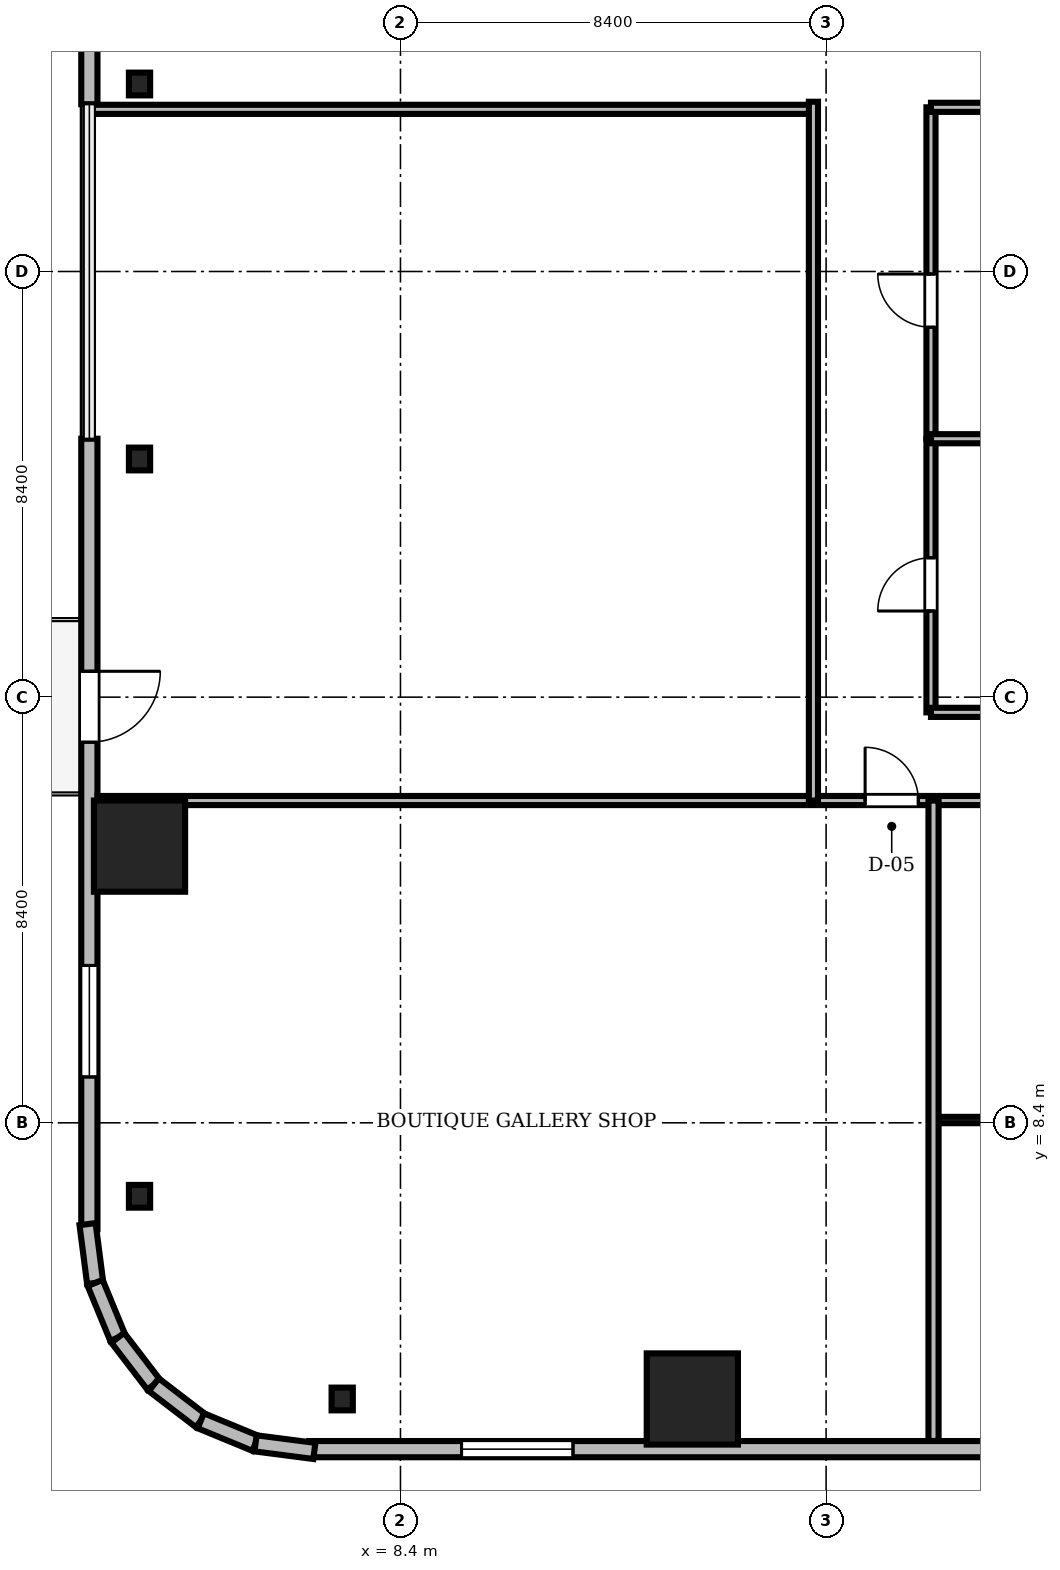
"""IFC4 building model, lengths in metres.
Left out: names, types, materials, properties, quantities, classifications, styles, units other than length and angle.
Written with IfcOpenShell. Run it as: python <this file> out.ifc"""

import sys

from ifc_helpers import new_model, si_unit, direction, frame, frame_2d, origin, origin_2d, place, context, subcontext, project, spatial, rectangle, i_section, extrude, source, transform, mapped, element, fill, save


model = new_model("IFC4")
c1 = context("Model", 3, precision=1e-05, world=origin(), true_north=direction((0.0, 1.0)))
c2 = subcontext(c1, "Body", "Model", "MODEL_VIEW")
j1 = project(units=[si_unit("LENGTHUNIT", "METRE"), si_unit("PLANEANGLEUNIT", "RADIAN")], contexts=[c1])
p1 = place(None, origin())
s1 = spatial("IfcSite", under=j1, at=p1, CompositionType="ELEMENT")
p2 = place(p1, origin())
s2 = spatial("IfcBuilding", under=s1, at=p2, CompositionType="ELEMENT")
p3 = place(p2, frame((0.0, 0.0, 75.05)))
s3 = spatial("IfcBuildingStorey", under=s2, at=p3, CompositionType="ELEMENT", Elevation=75.05)
m1 = source(origin(), c2, "Body", "SweptSolid", [
    extrude(rectangle(XDim=1.8, YDim=1.8, at=origin_2d()), origin(), (0.0, 0.0, 1.0), 3.41),
])
for number, where, z_axis, x_axis in (
    (1, (14.16, 2.95, 0.0), (0.0, 0.0, 1.0), (1.0, 0.0, 0.0)),
    (2, (3.25, 13.86, 0.0), (0.0, 0.0, 1.0), (1.0, 0.0, 0.0)),
):
    element("IfcColumn", number, at=place(p3, frame(where, z_axis=z_axis, x_axis=x_axis)), inside=s3, PredefinedType="COLUMN", context=c2, shape_type="MappedRepresentation", body=[
        mapped(m1, transform((0.0, 0.0, 0.0), scale=1.0)),
    ])
m2 = source(origin(), c2, "Body", "SweptSolid", [
    extrude(i_section(OverallWidth=0.419, OverallDepth=0.449, WebThickness=0.031, FlangeThickness=0.048, FilletRadius=0.015, at=origin_2d()), origin(), (0.0, 0.0, 1.0), 3.41),
])
for number, where, z_axis, x_axis in (
    (3, (7.25, 2.95, 0.0), (0.0, 0.0, 1.0), (1.0, 0.0, 0.0)),
    (4, (3.25, 28.9, 0.0), (0.0, 0.0, 1.0), (1.0, 0.0, 0.0)),
    (5, (3.25, 21.5, 0.0), (0.0, 0.0, 1.0), (1.0, 0.0, 0.0)),
    (6, (3.25, 6.95, 0.0), (0.0, 0.0, 1.0), (1.0, 0.0, 0.0)),
):
    element("IfcColumn", number, at=place(p3, frame(where, z_axis=z_axis, x_axis=x_axis)), inside=s3, PredefinedType="COLUMN", context=c2, shape_type="MappedRepresentation", body=[
        mapped(m2, transform((0.0, 0.0, 0.0), scale=1.0)),
    ])
m3 = source(origin(), c2, "Body", "SweptSolid", [
    extrude(rectangle(XDim=15.6, YDim=0.32, at=frame_2d((7.8, 0.0))), origin(), (0.0, 0.0, 1.0), 3.41),
])
p4 = place(p3, frame((6.6, 1.96, 0.0), z_axis=(0.0, 0.0, 1.0), x_axis=(1.0, 0.0, 0.0)))
e7 = element("IfcWall", 7, at=p4, inside=s3, PredefinedType="SOLIDWALL", context=c2, shape_type="MappedRepresentation", body=[
    mapped(m3, transform((0.0, 0.0, 0.0), scale=1.0)),
])
m4 = source(origin(), c2, "Body", "SweptSolid", [
    extrude(rectangle(XDim=2.2, YDim=2.4, at=frame_2d((1.1, 1.2))), frame((0.0, 0.17, 0.0), z_axis=(0.0, -1.0, 0.0), x_axis=(1.0, 0.0, 0.0)), (0.0, 0.0, 1.0), 0.34),
])
p5 = place(p4, frame((3.005, 0.0, 0.72)))
e8 = element("IfcOpeningElement", 8, at=p5, cuts=e7, PredefinedType="OPENING", context=c2, shape_type="MappedRepresentation", body=[
    mapped(m4, transform((0.0, 0.0, 0.0), scale=1.0)),
])
m5 = source(origin(), c2, "Body", "SweptSolid", [
    extrude(rectangle(XDim=15.6, YDim=0.32, at=frame_2d((7.8, 0.0))), origin(), (0.0, 0.0, 1.0), 3.41),
])
p6 = place(p3, frame((2.26, 44.1, 0.0), z_axis=(0.0, 0.0, 1.0), x_axis=(0.0, -1.0, 0.0)))
e9 = element("IfcWall", 9, at=p6, inside=s3, PredefinedType="SOLIDWALL", context=c2, shape_type="MappedRepresentation", body=[
    mapped(m5, transform((0.0, 0.0, 0.0), scale=1.0)),
])
p7 = place(p6, frame((3.005, 0.0, 0.72)))
e10 = element("IfcOpeningElement", 10, at=p7, cuts=e9, PredefinedType="OPENING", context=c2, shape_type="MappedRepresentation", body=[
    mapped(m4, transform((0.0, 0.0, 0.0), scale=1.0)),
])
p8 = place(p3, frame((2.26, 21.9, 0.0), z_axis=(0.0, 0.0, 1.0), x_axis=(0.0, -1.0, 0.0)))
e11 = element("IfcWall", 11, at=p8, inside=s3, PredefinedType="SOLIDWALL", context=c2, shape_type="MappedRepresentation", body=[
    mapped(m3, transform((0.0, 0.0, 0.0), scale=1.0)),
])
m6 = source(origin(), c2, "Body", "SweptSolid", [
    extrude(rectangle(XDim=1.4, YDim=2.3, at=frame_2d((0.7, 1.15))), frame((0.0, 0.17, 0.0), z_axis=(0.0, -1.0, 0.0), x_axis=(1.0, 0.0, 0.0)), (0.0, 0.0, 1.0), 0.34),
])
p9 = place(p8, frame((4.59, 0.0, 0.0)))
e12 = element("IfcOpeningElement", 12, at=p9, cuts=e11, PredefinedType="OPENING", context=c2, shape_type="MappedRepresentation", body=[
    mapped(m6, transform((0.0, 0.0, 0.0), scale=1.0)),
])
p10 = place(p8, frame((10.395, 0.0, 0.72)))
e13 = element("IfcOpeningElement", 13, at=p10, cuts=e11, PredefinedType="OPENING", context=c2, shape_type="MappedRepresentation", body=[
    mapped(m4, transform((0.0, 0.0, 0.0), scale=1.0)),
])
m7 = source(origin(), c2, "Body", "SweptSolid", [
    extrude(rectangle(XDim=1.171, YDim=0.32, at=frame_2d((0.585, 0.0))), origin(), (0.0, 0.0, 1.0), 3.41),
])
p11 = place(p3, frame((2.224, 6.401, 0.0), z_axis=(0.0, 0.0, 1.0), x_axis=(0.128269133229, -0.991739395941, 0.0)))
e14 = element("IfcWall", 14, at=p11, inside=s3, PredefinedType="SOLIDWALL", context=c2, shape_type="MappedRepresentation", body=[
    mapped(m7, transform((0.0, 0.0, 0.0), scale=1.0)),
])
m8 = source(origin(), c2, "Body", "SweptSolid", [
    extrude(rectangle(XDim=1.169, YDim=0.32, at=frame_2d((0.584, 0.0))), origin(), (0.0, 0.0, 1.0), 3.41),
])
for number, where, z_axis, x_axis in (
    (15, (2.375, 5.24, 0.0), (0.0, 0.0, 1.0), (0.381, -0.925, 0.0)),
    (16, (2.82, 4.159, 0.0), (0.0, 0.0, 1.0), (0.608, -0.794, 0.0)),
):
    element("IfcWall", number, at=place(p3, frame(where, z_axis=z_axis, x_axis=x_axis)), inside=s3, PredefinedType="SOLIDWALL", context=c2, shape_type="MappedRepresentation", body=[
        mapped(m8, transform((0.0, 0.0, 0.0), scale=1.0)),
    ])
m9 = source(origin(), c2, "Body", "SweptSolid", [
    extrude(rectangle(XDim=1.169, YDim=0.32, at=frame_2d((0.584, 0.0))), origin(), (0.0, 0.0, 1.0), 3.41),
])
p12 = place(p3, frame((3.531, 3.231, 0.0), z_axis=(0.0, 0.0, 1.0), x_axis=(0.793663520347, -0.608356981114, 0.0)))
e17 = element("IfcWall", 17, at=p12, inside=s3, PredefinedType="SOLIDWALL", context=c2, shape_type="MappedRepresentation", body=[
    mapped(m9, transform((0.0, 0.0, 0.0), scale=1.0)),
])
m10 = source(origin(), c2, "Body", "SweptSolid", [
    extrude(rectangle(XDim=1.169, YDim=0.32, at=frame_2d((0.585, 0.0))), origin(), (0.0, 0.0, 1.0), 3.41),
])
p13 = place(p3, frame((4.459, 2.52, 0.0), z_axis=(0.0, 0.0, 1.0), x_axis=(0.924479075121, -0.381232789334, 0.0)))
e18 = element("IfcWall", 18, at=p13, inside=s3, PredefinedType="SOLIDWALL", context=c2, shape_type="MappedRepresentation", body=[
    mapped(m10, transform((0.0, 0.0, 0.0), scale=1.0)),
])
m11 = source(origin(), c2, "Body", "SweptSolid", [
    extrude(rectangle(XDim=1.17, YDim=0.32, at=frame_2d((0.585, 0.0))), origin(), (0.0, 0.0, 1.0), 3.41),
])
p14 = place(p3, frame((5.54, 2.074, 0.0), z_axis=(0.0, 0.0, 1.0), x_axis=(0.991762485493, -0.128090485085, 0.0)))
e19 = element("IfcWall", 19, at=p14, inside=s3, PredefinedType="SOLIDWALL", context=c2, shape_type="MappedRepresentation", body=[
    mapped(m11, transform((0.0, 0.0, 0.0), scale=1.0)),
])
m12 = source(origin(), c2, "Body", "SweptSolid", [
    extrude(rectangle(XDim=46.156, YDim=0.18, at=frame_2d((23.078, 0.0))), origin(), (0.0, 0.0, 1.0), 2.652),
])
p15 = place(p3, frame((2.422, 14.76, 0.0), z_axis=(0.0, 0.0, 1.0), x_axis=(1.0, 0.0, 0.0)))
e20 = element("IfcWall", 20, at=p15, inside=s3, PredefinedType="PARTITIONING", context=c2, shape_type="MappedRepresentation", body=[
    mapped(m12, transform((0.0, 0.0, 0.0), scale=1.0)),
])
m13 = source(origin(), c2, "Body", "SweptSolid", [
    extrude(rectangle(XDim=1.05, YDim=2.2, at=frame_2d((0.525, 1.1))), frame((0.0, 0.1, 0.0), z_axis=(0.0, -1.0, 0.0), x_axis=(1.0, 0.0, 0.0)), (0.0, 0.0, 1.0), 0.2),
])
p16 = place(p15, frame((15.148, 0.0, 0.0)))
e21 = element("IfcOpeningElement", 21, at=p16, cuts=e20, PredefinedType="OPENING", context=c2, shape_type="MappedRepresentation", body=[
    mapped(m13, transform((0.0, 0.0, 0.0), scale=1.0)),
])
p17 = place(p15, frame((19.38, 0.0, 0.0)))
e22 = element("IfcOpeningElement", 22, at=p17, cuts=e20, PredefinedType="OPENING", context=c2, shape_type="MappedRepresentation", body=[
    mapped(m13, transform((0.0, 0.0, 0.0), scale=1.0)),
])
p18 = place(p15, frame((26.183, 0.0, 0.0)))
e23 = element("IfcOpeningElement", 23, at=p18, cuts=e20, PredefinedType="OPENING", context=c2, shape_type="MappedRepresentation", body=[
    mapped(m13, transform((0.0, 0.0, 0.0), scale=1.0)),
])
p19 = place(p15, frame((32.986, 0.0, 0.0)))
e24 = element("IfcOpeningElement", 24, at=p19, cuts=e20, PredefinedType="OPENING", context=c2, shape_type="MappedRepresentation", body=[
    mapped(m13, transform((0.0, 0.0, 0.0), scale=1.0)),
])
p20 = place(p15, frame((40.998, 0.0, 0.0)))
e25 = element("IfcOpeningElement", 25, at=p20, cuts=e20, PredefinedType="OPENING", context=c2, shape_type="MappedRepresentation", body=[
    mapped(m13, transform((0.0, 0.0, 0.0), scale=1.0)),
])
m14 = source(origin(), c2, "Body", "SweptSolid", [
    extrude(rectangle(XDim=6.803, YDim=0.125, at=frame_2d((3.401, 0.0))), origin(), (0.0, 0.0, 1.0), 2.802),
])
p21 = place(p3, frame((18.92, 8.455, 0.0), z_axis=(0.0, 0.0, 1.0), x_axis=(1.0, 0.0, 0.0)))
e26 = element("IfcWall", 26, at=p21, inside=s3, PredefinedType="PARTITIONING", context=c2, shape_type="MappedRepresentation", body=[
    mapped(m14, transform((0.0, 0.0, 0.0), scale=1.0)),
])
m15 = source(origin(), c2, "Body", "SweptSolid", [
    extrude(rectangle(XDim=0.95, YDim=2.15, at=frame_2d((0.475, 1.075))), frame((0.0, 0.073, 0.0), z_axis=(0.0, -1.0, 0.0), x_axis=(1.0, 0.0, 0.0)), (0.0, 0.0, 1.0), 0.145),
])
p22 = place(p21, frame((2.922, 0.0, 0.0)))
e27 = element("IfcOpeningElement", 27, at=p22, cuts=e26, PredefinedType="OPENING", context=c2, shape_type="MappedRepresentation", body=[
    mapped(m15, transform((0.0, 0.0, 0.0), scale=1.0)),
])
m16 = source(origin(), c2, "Body", "SweptSolid", [
    extrude(rectangle(XDim=6.54, YDim=0.18, at=frame_2d((3.27, 0.0))), origin(), (0.0, 0.0, 1.0), 2.802),
])
p23 = place(p3, frame((18.87, 21.9, 0.0), z_axis=(0.0, 0.0, 1.0), x_axis=(0.0, 1.0, 0.0)))
e28 = element("IfcWall", 28, at=p23, inside=s3, PredefinedType="PARTITIONING", context=c2, shape_type="MappedRepresentation", body=[
    mapped(m16, transform((0.0, 0.0, 0.0), scale=1.0)),
])
p24 = place(p23, frame((2.2, 0.0, 0.0)))
e29 = element("IfcOpeningElement", 29, at=p24, cuts=e28, PredefinedType="OPENING", context=c2, shape_type="MappedRepresentation", body=[
    mapped(m13, transform((0.0, 0.0, 0.0), scale=1.0)),
])
m17 = source(origin(), c2, "Body", "SweptSolid", [
    extrude(rectangle(XDim=5.4, YDim=0.18, at=frame_2d((2.7, 0.0))), origin(), (0.0, 0.0, 1.0), 2.802),
])
p25 = place(p3, frame((18.87, 16.5, 0.0), z_axis=(0.0, 0.0, 1.0), x_axis=(0.0, 1.0, 0.0)))
e30 = element("IfcWall", 30, at=p25, inside=s3, PredefinedType="PARTITIONING", context=c2, shape_type="MappedRepresentation", body=[
    mapped(m17, transform((0.0, 0.0, 0.0), scale=1.0)),
])
p26 = place(p25, frame((2.0, 0.0, 0.0)))
e31 = element("IfcOpeningElement", 31, at=p26, cuts=e30, PredefinedType="OPENING", context=c2, shape_type="MappedRepresentation", body=[
    mapped(m13, transform((0.0, 0.0, 0.0), scale=1.0)),
])
m18 = source(origin(), c2, "Body", "SweptSolid", [
    extrude(rectangle(XDim=14.32, YDim=0.18, at=frame_2d((7.16, 0.0))), origin(), (0.0, 0.0, 1.0), 2.652),
])
p27 = place(p3, frame((2.23, 28.4, 0.0), z_axis=(0.0, 0.0, 1.0), x_axis=(1.0, 0.0, 0.0)))
e32 = element("IfcWall", 32, at=p27, inside=s3, PredefinedType="PARTITIONING", context=c2, shape_type="MappedRepresentation", body=[
    mapped(m18, transform((0.0, 0.0, 0.0), scale=1.0)),
])
m19 = source(origin(), c2, "Body", "SweptSolid", [
    extrude(rectangle(XDim=13.79, YDim=0.18, at=frame_2d((6.895, 0.0))), origin(), (0.0, 0.0, 1.0), 2.802),
])
p28 = place(p3, frame((16.55, 14.76, 0.0), z_axis=(0.0, 0.0, 1.0), x_axis=(0.0, 1.0, 0.0)))
e33 = element("IfcWall", 33, at=p28, inside=s3, PredefinedType="PARTITIONING", context=c2, shape_type="MappedRepresentation", body=[
    mapped(m19, transform((0.0, 0.0, 0.0), scale=1.0)),
])
m20 = source(origin(), c2, "Body", "SweptSolid", [
    extrude(rectangle(XDim=12.638, YDim=0.2, at=frame_2d((6.319, 0.0))), origin(), (0.0, 0.0, 1.0), 2.652),
])
p29 = place(p3, frame((18.92, 2.122, 0.0), z_axis=(0.0, 0.0, 1.0), x_axis=(0.0, 1.0, 0.0)))
e34 = element("IfcWall", 34, at=p29, inside=s3, PredefinedType="PARTITIONING", context=c2, shape_type="MappedRepresentation", body=[
    mapped(m20, transform((0.0, 0.0, 0.0), scale=1.0)),
])
m21 = source(origin(), c2, "Body", "SweptSolid", [
    extrude(rectangle(XDim=9.53, YDim=0.18, at=frame_2d((4.765, 0.0))), origin(), (0.0, 0.0, 1.0), 2.802),
])
p30 = place(p3, frame((18.87, 16.5, 0.0), z_axis=(0.0, 0.0, 1.0), x_axis=(1.0, 0.0, 0.0)))
e35 = element("IfcWall", 35, at=p30, inside=s3, PredefinedType="PARTITIONING", context=c2, shape_type="MappedRepresentation", body=[
    mapped(m21, transform((0.0, 0.0, 0.0), scale=1.0)),
])
m22 = source(origin(), c2, "Body", "SweptSolid", [
    extrude(rectangle(XDim=9.53, YDim=0.18, at=frame_2d((4.765, 0.0))), origin(), (0.0, 0.0, 1.0), 3.41),
])
for number, where, z_axis, x_axis in (
    (36, (18.87, 21.9, 0.0), (0.0, 0.0, 1.0), (1.0, 0.0, 0.0)),
    (37, (18.87, 28.44, 0.0), (0.0, 0.0, 1.0), (1.0, 0.0, 0.0)),
):
    element("IfcWall", number, at=place(p3, frame(where, z_axis=z_axis, x_axis=x_axis)), inside=s3, PredefinedType="PARTITIONING", context=c2, shape_type="MappedRepresentation", body=[
        mapped(m22, transform((0.0, 0.0, 0.0), scale=1.0)),
    ])
m23 = source(origin(), c2, "Body", "SweptSolid", [
    extrude(rectangle(XDim=2.2, YDim=2.4, at=frame_2d((1.1, 1.2))), frame((0.0, 0.03, 0.0), z_axis=(0.0, -1.0, 0.0), x_axis=(1.0, 0.0, 0.0)), (0.0, 0.0, 1.0), 0.06),
])
p31 = place(p5, origin())
e38 = element("IfcWindow", 38, at=p31, inside=s3, PartitioningType="SINGLE_PANEL", PredefinedType="WINDOW", context=c2, shape_type="MappedRepresentation", body=[
    mapped(m23, transform((0.0, 0.0, 0.0), scale=1.0)),
])
fill(e8, e38)
m24 = source(origin(), c2, "Body", "SweptSolid", [
    extrude(rectangle(XDim=1.4, YDim=2.3, at=frame_2d((0.7, 1.15))), frame((0.0, 0.025, 0.0), z_axis=(0.0, -1.0, 0.0), x_axis=(1.0, 0.0, 0.0)), (0.0, 0.0, 1.0), 0.05),
])
p32 = place(p9, frame((1.4, 0.0, 0.0), z_axis=(0.0, 0.0, 1.0), x_axis=(-1.0, 0.0, 0.0)))
e39 = element("IfcDoor", 39, at=p32, inside=s3, OperationType="DOUBLE_DOOR_SLIDING", PredefinedType="DOOR", context=c2, shape_type="MappedRepresentation", body=[
    mapped(m24, transform((0.0, 0.0, 0.0), scale=1.0)),
])
fill(e12, e39)
p33 = place(p10, origin())
e40 = element("IfcWindow", 40, at=p33, inside=s3, PartitioningType="SINGLE_PANEL", PredefinedType="WINDOW", context=c2, shape_type="MappedRepresentation", body=[
    mapped(m23, transform((0.0, 0.0, 0.0), scale=1.0)),
])
fill(e13, e40)
m25 = source(origin(), c2, "Body", "SweptSolid", [
    extrude(rectangle(XDim=1.05, YDim=2.2, at=frame_2d((0.525, 1.1))), frame((0.0, 0.025, 0.0), z_axis=(0.0, -1.0, 0.0), x_axis=(1.0, 0.0, 0.0)), (0.0, 0.0, 1.0), 0.05),
])
p34 = place(p16, origin())
e41 = element("IfcDoor", 41, at=p34, inside=s3, OperationType="SINGLE_SWING_LEFT", PredefinedType="DOOR", context=c2, shape_type="MappedRepresentation", body=[
    mapped(m25, transform((0.0, 0.0, 0.0), scale=1.0)),
])
fill(e21, e41)
p35 = place(p24, origin())
e42 = element("IfcDoor", 42, at=p35, inside=s3, OperationType="SINGLE_SWING_RIGHT", PredefinedType="DOOR", context=c2, shape_type="MappedRepresentation", body=[
    mapped(m25, transform((0.0, 0.0, 0.0), scale=1.0)),
])
fill(e29, e42)
p36 = place(p26, origin())
e43 = element("IfcDoor", 43, at=p36, inside=s3, OperationType="SINGLE_SWING_LEFT", PredefinedType="DOOR", context=c2, shape_type="MappedRepresentation", body=[
    mapped(m25, transform((0.0, 0.0, 0.0), scale=1.0)),
])
fill(e31, e43)
save(model, sys.argv[1])
